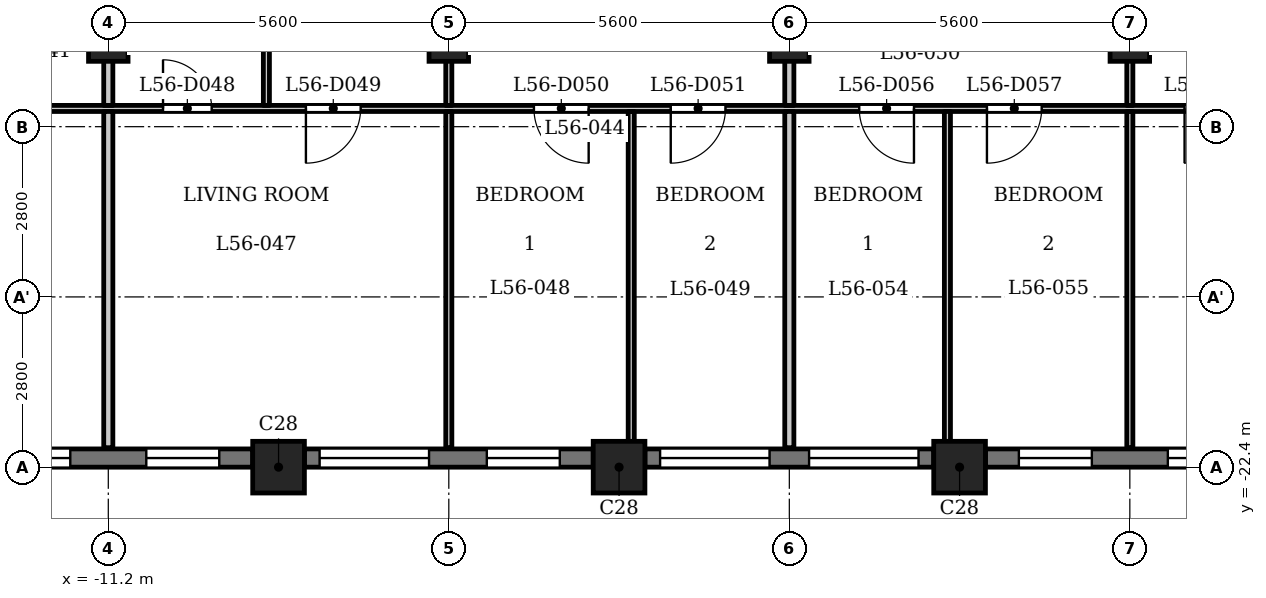
"""IFC4 building model, lengths in metres.
Left out: names, types, materials, properties, quantities, classifications, styles, units other than length and angle.
Written with IfcOpenShell. Run it as: python <this file> out.ifc"""

import sys

from ifc_helpers import new_model, si_unit, direction, frame, frame_2d, origin, origin_2d, place, context, subcontext, project, spatial, rectangle, extrude, element, fill, save


model = new_model("IFC4")
c1 = context("Model", 3, precision=1e-05, world=origin(), true_north=direction((0.0, 1.0)))
c2 = subcontext(c1, "Body", "Model", "MODEL_VIEW")
j1 = project(units=[si_unit("LENGTHUNIT", "METRE"), si_unit("PLANEANGLEUNIT", "RADIAN")], contexts=[c1])
p1 = place(None, origin())
s1 = spatial("IfcSite", under=j1, at=p1, CompositionType="ELEMENT")
p2 = place(p1, origin())
s2 = spatial("IfcBuilding", under=s1, at=p2, CompositionType="ELEMENT")
p3 = place(p2, frame((0.0, 0.0, 216.9)))
s3 = spatial("IfcBuildingStorey", under=s2, at=p3, CompositionType="ELEMENT", Elevation=216.9)
for number, where, z_axis, x_axis in (
    (1, (-8.4, -22.4, 0.0), (0.0, 0.0, 1.0), (1.0, 0.0, 0.0)),
    (2, (-2.8, -22.4, 0.0), (0.0, 0.0, 1.0), (1.0, 0.0, 0.0)),
    (3, (2.8, -22.4, 0.0), (0.0, 0.0, 1.0), (1.0, 0.0, 0.0)),
):
    element("IfcColumn", number, at=place(p3, frame(where, z_axis=z_axis, x_axis=x_axis)), inside=s3, PredefinedType="COLUMN", context=c2, shape_type="SweptSolid", body=[
        extrude(rectangle(XDim=0.85, YDim=0.85, at=origin_2d()), origin(), (0.0, 0.0, 1.0), 3.5),
    ])
for number, where, z_axis, x_axis in (
    (4, (-11.2, -15.4, 0.0), (0.0, 0.0, 1.0), (1.0, 0.0, 0.0)),
    (5, (-5.6, -15.4, 0.0), (0.0, 0.0, 1.0), (1.0, 0.0, 0.0)),
    (6, (0.0, -15.4, 0.0), (0.0, 0.0, 1.0), (1.0, 0.0, 0.0)),
    (7, (5.6, -15.4, 0.0), (0.0, 0.0, 1.0), (1.0, 0.0, 0.0)),
):
    element("IfcColumn", number, at=place(p3, frame(where, z_axis=z_axis, x_axis=x_axis)), inside=s3, PredefinedType="COLUMN", context=c2, shape_type="SweptSolid", body=[
        extrude(rectangle(XDim=0.65, YDim=0.65, at=origin_2d()), origin(), (0.0, 0.0, 1.0), 3.5),
    ])
p4 = place(p3, frame((-13.575, -22.25, 0.0), z_axis=(0.0, 0.0, 1.0), x_axis=(1.0, 0.0, 0.0)))
e8 = element("IfcWall", 8, at=p4, inside=s3, PredefinedType="SOLIDWALL", context=c2, shape_type="SweptSolid", body=[
    extrude(rectangle(XDim=4.75, YDim=0.3, at=frame_2d((2.375, 0.0))), origin(), (0.0, 0.0, 1.0), 2.5),
])
p5 = place(p4, frame((0.55, 0.0, 0.6)))
e9 = element("IfcOpeningElement", 9, at=p5, cuts=e8, PredefinedType="OPENING", context=c2, shape_type="SweptSolid", body=[
    extrude(rectangle(XDim=1.2, YDim=1.55, at=frame_2d((0.6, 0.775))), frame((0.0, 0.16, 0.0), z_axis=(0.0, -1.0, 0.0), x_axis=(1.0, 0.0, 0.0)), (0.0, 0.0, 1.0), 0.32),
])
p6 = place(p4, frame((3.0, 0.0, 0.6)))
e10 = element("IfcOpeningElement", 10, at=p6, cuts=e8, PredefinedType="OPENING", context=c2, shape_type="SweptSolid", body=[
    extrude(rectangle(XDim=1.2, YDim=1.55, at=frame_2d((0.6, 0.775))), frame((0.0, 0.16, 0.0), z_axis=(0.0, -1.0, 0.0), x_axis=(1.0, 0.0, 0.0)), (0.0, 0.0, 1.0), 0.32),
])
p7 = place(p3, frame((-7.975, -22.25, 0.0), z_axis=(0.0, 0.0, 1.0), x_axis=(1.0, 0.0, 0.0)))
e11 = element("IfcWall", 11, at=p7, inside=s3, PredefinedType="SOLIDWALL", context=c2, shape_type="SweptSolid", body=[
    extrude(rectangle(XDim=4.75, YDim=0.3, at=frame_2d((2.375, 0.0))), origin(), (0.0, 0.0, 1.0), 2.5),
])
p8 = place(p7, frame((0.25, 0.0, 0.9)))
e12 = element("IfcOpeningElement", 12, at=p8, cuts=e11, PredefinedType="OPENING", context=c2, shape_type="SweptSolid", body=[
    extrude(rectangle(XDim=1.8, YDim=1.25, at=frame_2d((0.9, 0.625))), frame((0.0, 0.16, 0.0), z_axis=(0.0, -1.0, 0.0), x_axis=(1.0, 0.0, 0.0)), (0.0, 0.0, 1.0), 0.32),
])
p9 = place(p7, frame((3.0, 0.0, 0.6)))
e13 = element("IfcOpeningElement", 13, at=p9, cuts=e11, PredefinedType="OPENING", context=c2, shape_type="SweptSolid", body=[
    extrude(rectangle(XDim=1.2, YDim=1.55, at=frame_2d((0.6, 0.775))), frame((0.0, 0.16, 0.0), z_axis=(0.0, -1.0, 0.0), x_axis=(1.0, 0.0, 0.0)), (0.0, 0.0, 1.0), 0.32),
])
p10 = place(p3, frame((-2.375, -22.25, 0.0), z_axis=(0.0, 0.0, 1.0), x_axis=(1.0, 0.0, 0.0)))
e14 = element("IfcWall", 14, at=p10, inside=s3, PredefinedType="SOLIDWALL", context=c2, shape_type="SweptSolid", body=[
    extrude(rectangle(XDim=4.75, YDim=0.3, at=frame_2d((2.375, 0.0))), origin(), (0.0, 0.0, 1.0), 2.5),
])
p11 = place(p10, frame((0.25, 0.0, 0.9)))
e15 = element("IfcOpeningElement", 15, at=p11, cuts=e14, PredefinedType="OPENING", context=c2, shape_type="SweptSolid", body=[
    extrude(rectangle(XDim=1.8, YDim=1.25, at=frame_2d((0.9, 0.625))), frame((0.0, 0.16, 0.0), z_axis=(0.0, -1.0, 0.0), x_axis=(1.0, 0.0, 0.0)), (0.0, 0.0, 1.0), 0.32),
])
p12 = place(p10, frame((2.7, 0.0, 0.9)))
e16 = element("IfcOpeningElement", 16, at=p12, cuts=e14, PredefinedType="OPENING", context=c2, shape_type="SweptSolid", body=[
    extrude(rectangle(XDim=1.8, YDim=1.25, at=frame_2d((0.9, 0.625))), frame((0.0, 0.16, 0.0), z_axis=(0.0, -1.0, 0.0), x_axis=(1.0, 0.0, 0.0)), (0.0, 0.0, 1.0), 0.32),
])
p13 = place(p3, frame((3.225, -22.25, 0.0), z_axis=(0.0, 0.0, 1.0), x_axis=(1.0, 0.0, 0.0)))
e17 = element("IfcWall", 17, at=p13, inside=s3, PredefinedType="SOLIDWALL", context=c2, shape_type="SweptSolid", body=[
    extrude(rectangle(XDim=4.75, YDim=0.3, at=frame_2d((2.375, 0.0))), origin(), (0.0, 0.0, 1.0), 2.5),
])
p14 = place(p13, frame((0.55, 0.0, 0.6)))
e18 = element("IfcOpeningElement", 18, at=p14, cuts=e17, PredefinedType="OPENING", context=c2, shape_type="SweptSolid", body=[
    extrude(rectangle(XDim=1.2, YDim=1.55, at=frame_2d((0.6, 0.775))), frame((0.0, 0.16, 0.0), z_axis=(0.0, -1.0, 0.0), x_axis=(1.0, 0.0, 0.0)), (0.0, 0.0, 1.0), 0.32),
])
p15 = place(p13, frame((3.0, 0.0, 0.6)))
e19 = element("IfcOpeningElement", 19, at=p15, cuts=e17, PredefinedType="OPENING", context=c2, shape_type="SweptSolid", body=[
    extrude(rectangle(XDim=1.2, YDim=1.55, at=frame_2d((0.6, 0.775))), frame((0.0, 0.16, 0.0), z_axis=(0.0, -1.0, 0.0), x_axis=(1.0, 0.0, 0.0)), (0.0, 0.0, 1.0), 0.32),
])
p16 = place(p3, frame((-16.725, -16.5, 0.0), z_axis=(0.0, 0.0, 1.0), x_axis=(1.0, 0.0, 0.0)))
e20 = element("IfcWall", 20, at=p16, inside=s3, PredefinedType="PARTITIONING", context=c2, shape_type="SweptSolid", body=[
    extrude(rectangle(XDim=33.45, YDim=0.1, at=frame_2d((16.725, 0.0))), origin(), (0.0, 0.0, 1.0), 3.2),
])
p17 = place(p16, frame((0.675, 0.0, 0.0)))
e21 = element("IfcOpeningElement", 21, at=p17, cuts=e20, PredefinedType="OPENING", context=c2, shape_type="SweptSolid", body=[
    extrude(rectangle(XDim=0.8, YDim=2.1, at=frame_2d((0.4, 1.05))), frame((0.0, 0.06, 0.0), z_axis=(0.0, -1.0, 0.0), x_axis=(1.0, 0.0, 0.0)), (0.0, 0.0, 1.0), 0.12),
])
p18 = place(p16, frame((2.775, 0.0, 0.0)))
e22 = element("IfcOpeningElement", 22, at=p18, cuts=e20, PredefinedType="OPENING", context=c2, shape_type="SweptSolid", body=[
    extrude(rectangle(XDim=0.9, YDim=2.1, at=frame_2d((0.45, 1.05))), frame((0.0, 0.06, 0.0), z_axis=(0.0, -1.0, 0.0), x_axis=(1.0, 0.0, 0.0)), (0.0, 0.0, 1.0), 0.12),
])
p19 = place(p16, frame((6.425, 0.0, 0.0)))
e23 = element("IfcOpeningElement", 23, at=p19, cuts=e20, PredefinedType="OPENING", context=c2, shape_type="SweptSolid", body=[
    extrude(rectangle(XDim=0.8, YDim=2.1, at=frame_2d((0.4, 1.05))), frame((0.0, 0.06, 0.0), z_axis=(0.0, -1.0, 0.0), x_axis=(1.0, 0.0, 0.0)), (0.0, 0.0, 1.0), 0.12),
])
p20 = place(p16, frame((8.775, 0.0, 0.0)))
e24 = element("IfcOpeningElement", 24, at=p20, cuts=e20, PredefinedType="OPENING", context=c2, shape_type="SweptSolid", body=[
    extrude(rectangle(XDim=0.9, YDim=2.1, at=frame_2d((0.45, 1.05))), frame((0.0, 0.06, 0.0), z_axis=(0.0, -1.0, 0.0), x_axis=(1.0, 0.0, 0.0)), (0.0, 0.0, 1.0), 0.12),
])
p21 = place(p16, frame((12.525, 0.0, 0.0)))
e25 = element("IfcOpeningElement", 25, at=p21, cuts=e20, PredefinedType="OPENING", context=c2, shape_type="SweptSolid", body=[
    extrude(rectangle(XDim=0.9, YDim=2.1, at=frame_2d((0.45, 1.05))), frame((0.0, 0.06, 0.0), z_axis=(0.0, -1.0, 0.0), x_axis=(1.0, 0.0, 0.0)), (0.0, 0.0, 1.0), 0.12),
])
p22 = place(p16, frame((14.775, 0.0, 0.0)))
e26 = element("IfcOpeningElement", 26, at=p22, cuts=e20, PredefinedType="OPENING", context=c2, shape_type="SweptSolid", body=[
    extrude(rectangle(XDim=0.9, YDim=2.1, at=frame_2d((0.45, 1.05))), frame((0.0, 0.06, 0.0), z_axis=(0.0, -1.0, 0.0), x_axis=(1.0, 0.0, 0.0)), (0.0, 0.0, 1.0), 0.12),
])
p23 = place(p16, frame((25.475, 0.0, 0.0)))
e27 = element("IfcOpeningElement", 27, at=p23, cuts=e20, PredefinedType="OPENING", context=c2, shape_type="SweptSolid", body=[
    extrude(rectangle(XDim=0.8, YDim=2.1, at=frame_2d((0.4, 1.05))), frame((0.0, 0.06, 0.0), z_axis=(0.0, -1.0, 0.0), x_axis=(1.0, 0.0, 0.0)), (0.0, 0.0, 1.0), 0.12),
])
p24 = place(p16, frame((23.225, 0.0, 0.0)))
e28 = element("IfcOpeningElement", 28, at=p24, cuts=e20, PredefinedType="OPENING", context=c2, shape_type="SweptSolid", body=[
    extrude(rectangle(XDim=0.9, YDim=2.1, at=frame_2d((0.45, 1.05))), frame((0.0, 0.06, 0.0), z_axis=(0.0, -1.0, 0.0), x_axis=(1.0, 0.0, 0.0)), (0.0, 0.0, 1.0), 0.12),
])
p25 = place(p16, frame((17.875, 0.0, 0.0)))
e29 = element("IfcOpeningElement", 29, at=p25, cuts=e20, PredefinedType="OPENING", context=c2, shape_type="SweptSolid", body=[
    extrude(rectangle(XDim=0.9, YDim=2.1, at=frame_2d((0.45, 1.05))), frame((0.0, 0.06, 0.0), z_axis=(0.0, -1.0, 0.0), x_axis=(1.0, 0.0, 0.0)), (0.0, 0.0, 1.0), 0.12),
])
p26 = place(p16, frame((19.975, 0.0, 0.0)))
e30 = element("IfcOpeningElement", 30, at=p26, cuts=e20, PredefinedType="OPENING", context=c2, shape_type="SweptSolid", body=[
    extrude(rectangle(XDim=0.9, YDim=2.1, at=frame_2d((0.45, 1.05))), frame((0.0, 0.06, 0.0), z_axis=(0.0, -1.0, 0.0), x_axis=(1.0, 0.0, 0.0)), (0.0, 0.0, 1.0), 0.12),
])
p27 = place(p16, frame((30.825, 0.0, 0.0)))
e31 = element("IfcOpeningElement", 31, at=p27, cuts=e20, PredefinedType="OPENING", context=c2, shape_type="SweptSolid", body=[
    extrude(rectangle(XDim=0.8, YDim=2.1, at=frame_2d((0.4, 1.05))), frame((0.0, 0.06, 0.0), z_axis=(0.0, -1.0, 0.0), x_axis=(1.0, 0.0, 0.0)), (0.0, 0.0, 1.0), 0.12),
])
p28 = place(p16, frame((29.075, 0.0, 0.0)))
e32 = element("IfcOpeningElement", 32, at=p28, cuts=e20, PredefinedType="OPENING", context=c2, shape_type="SweptSolid", body=[
    extrude(rectangle(XDim=0.9, YDim=2.1, at=frame_2d((0.45, 1.05))), frame((0.0, 0.06, 0.0), z_axis=(0.0, -1.0, 0.0), x_axis=(1.0, 0.0, 0.0)), (0.0, 0.0, 1.0), 0.12),
])
p29 = place(p3, frame((-11.2, -22.08, 0.0), z_axis=(0.0, 0.0, 1.0), x_axis=(0.0, 1.0, 0.0)))
e33 = element("IfcWall", 33, at=p29, inside=s3, PredefinedType="PARTITIONING", context=c2, shape_type="SweptSolid", body=[
    extrude(rectangle(XDim=5.53, YDim=0.15, at=frame_2d((2.765, 0.0))), origin(), (0.0, 0.0, 1.0), 3.2),
])
p30 = place(p3, frame((-11.2, -16.45, 0.0), z_axis=(0.0, 0.0, 1.0), x_axis=(0.0, 1.0, 0.0)))
e34 = element("IfcWall", 34, at=p30, inside=s3, PredefinedType="PARTITIONING", context=c2, shape_type="SweptSolid", body=[
    extrude(rectangle(XDim=3.175, YDim=0.15, at=frame_2d((1.587, 0.0))), origin(), (0.0, 0.0, 1.0), 3.2),
])
p31 = place(p3, frame((-8.6, -16.45, 0.0), z_axis=(0.0, 0.0, 1.0), x_axis=(0.0, 1.0, 0.0)))
e35 = element("IfcWall", 35, at=p31, inside=s3, PredefinedType="PARTITIONING", context=c2, shape_type="SweptSolid", body=[
    extrude(rectangle(XDim=3.175, YDim=0.1, at=frame_2d((1.587, 0.0))), origin(), (0.0, 0.0, 1.0), 3.2),
])
p32 = place(p3, frame((-5.6, -22.08, 0.0), z_axis=(0.0, 0.0, 1.0), x_axis=(0.0, 1.0, 0.0)))
e36 = element("IfcWall", 36, at=p32, inside=s3, PredefinedType="PARTITIONING", context=c2, shape_type="SweptSolid", body=[
    extrude(rectangle(XDim=5.53, YDim=0.1, at=frame_2d((2.765, 0.0))), origin(), (0.0, 0.0, 1.0), 3.2),
])
p33 = place(p3, frame((-5.6, -16.45, 0.0), z_axis=(0.0, 0.0, 1.0), x_axis=(0.0, 1.0, 0.0)))
e37 = element("IfcWall", 37, at=p33, inside=s3, PredefinedType="PARTITIONING", context=c2, shape_type="SweptSolid", body=[
    extrude(rectangle(XDim=3.175, YDim=0.1, at=frame_2d((1.587, 0.0))), origin(), (0.0, 0.0, 1.0), 3.2),
])
p34 = place(p33, frame((1.699, 0.0, 0.0)))
e38 = element("IfcOpeningElement", 38, at=p34, cuts=e37, PredefinedType="OPENING", context=c2, shape_type="SweptSolid", body=[
    extrude(rectangle(XDim=0.9, YDim=2.1, at=frame_2d((0.45, 1.05))), frame((0.0, 0.06, 0.0), z_axis=(0.0, -1.0, 0.0), x_axis=(1.0, 0.0, 0.0)), (0.0, 0.0, 1.0), 0.12),
])
p35 = place(p3, frame((-2.6, -22.805, 0.0), z_axis=(0.0, 0.0, 1.0), x_axis=(0.0, 1.0, 0.0)))
e39 = element("IfcWall", 39, at=p35, inside=s3, PredefinedType="PARTITIONING", context=c2, shape_type="SweptSolid", body=[
    extrude(rectangle(XDim=6.255, YDim=0.1, at=frame_2d((3.127, 0.0))), origin(), (0.0, 0.0, 1.0), 3.2),
])
p36 = place(p3, frame((0.0, -22.08, 0.0), z_axis=(0.0, 0.0, 1.0), x_axis=(0.0, 1.0, 0.0)))
e40 = element("IfcWall", 40, at=p36, inside=s3, PredefinedType="PARTITIONING", context=c2, shape_type="SweptSolid", body=[
    extrude(rectangle(XDim=5.53, YDim=0.15, at=frame_2d((2.765, 0.0))), origin(), (0.0, 0.0, 1.0), 3.2),
])
p37 = place(p3, frame((0.0, -16.45, 0.0), z_axis=(0.0, 0.0, 1.0), x_axis=(0.0, 1.0, 0.0)))
e41 = element("IfcWall", 41, at=p37, inside=s3, PredefinedType="PARTITIONING", context=c2, shape_type="SweptSolid", body=[
    extrude(rectangle(XDim=3.175, YDim=0.15, at=frame_2d((1.587, 0.0))), origin(), (0.0, 0.0, 1.0), 3.2),
])
p38 = place(p3, frame((2.6, -22.805, 0.0), z_axis=(0.0, 0.0, 1.0), x_axis=(0.0, 1.0, 0.0)))
e42 = element("IfcWall", 42, at=p38, inside=s3, PredefinedType="PARTITIONING", context=c2, shape_type="SweptSolid", body=[
    extrude(rectangle(XDim=6.255, YDim=0.1, at=frame_2d((3.127, 0.0))), origin(), (0.0, 0.0, 1.0), 3.2),
])
p39 = place(p3, frame((5.6, -22.08, 0.0), z_axis=(0.0, 0.0, 1.0), x_axis=(0.0, 1.0, 0.0)))
e43 = element("IfcWall", 43, at=p39, inside=s3, PredefinedType="PARTITIONING", context=c2, shape_type="SweptSolid", body=[
    extrude(rectangle(XDim=5.53, YDim=0.1, at=frame_2d((2.765, 0.0))), origin(), (0.0, 0.0, 1.0), 3.2),
])
p40 = place(p3, frame((5.6, -16.45, 0.0), z_axis=(0.0, 0.0, 1.0), x_axis=(0.0, 1.0, 0.0)))
e44 = element("IfcWall", 44, at=p40, inside=s3, PredefinedType="PARTITIONING", context=c2, shape_type="SweptSolid", body=[
    extrude(rectangle(XDim=3.175, YDim=0.1, at=frame_2d((1.587, 0.0))), origin(), (0.0, 0.0, 1.0), 3.2),
])
p41 = place(p40, frame((1.6, 0.0, 0.0)))
e45 = element("IfcOpeningElement", 45, at=p41, cuts=e44, PredefinedType="OPENING", context=c2, shape_type="SweptSolid", body=[
    extrude(rectangle(XDim=0.9, YDim=2.1, at=frame_2d((0.45, 1.05))), frame((0.0, 0.06, 0.0), z_axis=(0.0, -1.0, 0.0), x_axis=(1.0, 0.0, 0.0)), (0.0, 0.0, 1.0), 0.12),
])
p42 = place(p19, origin())
e46 = element("IfcDoor", 46, at=p42, inside=s3, OperationType="SINGLE_SWING_RIGHT", PredefinedType="DOOR", context=c2, shape_type="SweptSolid", body=[
    extrude(rectangle(XDim=0.8, YDim=2.1, at=frame_2d((0.4, 1.05))), frame((0.0, 0.025, 0.0), z_axis=(0.0, -1.0, 0.0), x_axis=(1.0, 0.0, 0.0)), (0.0, 0.0, 1.0), 0.05),
])
fill(e23, e46)
p43 = place(p20, origin())
e47 = element("IfcDoor", 47, at=p43, inside=s3, OperationType="SINGLE_SWING_LEFT", PredefinedType="DOOR", context=c2, shape_type="SweptSolid", body=[
    extrude(rectangle(XDim=0.9, YDim=2.1, at=frame_2d((0.45, 1.05))), frame((0.0, 0.025, 0.0), z_axis=(0.0, -1.0, 0.0), x_axis=(1.0, 0.0, 0.0)), (0.0, 0.0, 1.0), 0.05),
])
fill(e24, e47)
p44 = place(p21, origin())
e48 = element("IfcDoor", 48, at=p44, inside=s3, OperationType="SINGLE_SWING_RIGHT", PredefinedType="DOOR", context=c2, shape_type="SweptSolid", body=[
    extrude(rectangle(XDim=0.9, YDim=2.1, at=frame_2d((0.45, 1.05))), frame((0.0, 0.025, 0.0), z_axis=(0.0, -1.0, 0.0), x_axis=(1.0, 0.0, 0.0)), (0.0, 0.0, 1.0), 0.05),
])
fill(e25, e48)
p45 = place(p22, origin())
e49 = element("IfcDoor", 49, at=p45, inside=s3, OperationType="SINGLE_SWING_LEFT", PredefinedType="DOOR", context=c2, shape_type="SweptSolid", body=[
    extrude(rectangle(XDim=0.9, YDim=2.1, at=frame_2d((0.45, 1.05))), frame((0.0, 0.025, 0.0), z_axis=(0.0, -1.0, 0.0), x_axis=(1.0, 0.0, 0.0)), (0.0, 0.0, 1.0), 0.05),
])
fill(e26, e49)
p46 = place(p24, origin())
e50 = element("IfcDoor", 50, at=p46, inside=s3, OperationType="SINGLE_SWING_LEFT", PredefinedType="DOOR", context=c2, shape_type="SweptSolid", body=[
    extrude(rectangle(XDim=0.9, YDim=2.1, at=frame_2d((0.45, 1.05))), frame((0.0, 0.025, 0.0), z_axis=(0.0, -1.0, 0.0), x_axis=(1.0, 0.0, 0.0)), (0.0, 0.0, 1.0), 0.05),
])
fill(e28, e50)
p47 = place(p25, origin())
e51 = element("IfcDoor", 51, at=p47, inside=s3, OperationType="SINGLE_SWING_RIGHT", PredefinedType="DOOR", context=c2, shape_type="SweptSolid", body=[
    extrude(rectangle(XDim=0.9, YDim=2.1, at=frame_2d((0.45, 1.05))), frame((0.0, 0.025, 0.0), z_axis=(0.0, -1.0, 0.0), x_axis=(1.0, 0.0, 0.0)), (0.0, 0.0, 1.0), 0.05),
])
fill(e29, e51)
p48 = place(p26, origin())
e52 = element("IfcDoor", 52, at=p48, inside=s3, OperationType="SINGLE_SWING_LEFT", PredefinedType="DOOR", context=c2, shape_type="SweptSolid", body=[
    extrude(rectangle(XDim=0.9, YDim=2.1, at=frame_2d((0.45, 1.05))), frame((0.0, 0.025, 0.0), z_axis=(0.0, -1.0, 0.0), x_axis=(1.0, 0.0, 0.0)), (0.0, 0.0, 1.0), 0.05),
])
fill(e30, e52)
p49 = place(p5, origin())
e53 = element("IfcWindow", 53, at=p49, inside=s3, PartitioningType="SINGLE_PANEL", PredefinedType="WINDOW", context=c2, shape_type="SweptSolid", body=[
    extrude(rectangle(XDim=1.2, YDim=1.55, at=frame_2d((0.6, 0.775))), frame((0.0, 0.03, 0.0), z_axis=(0.0, -1.0, 0.0), x_axis=(1.0, 0.0, 0.0)), (0.0, 0.0, 1.0), 0.06),
])
fill(e9, e53)
p50 = place(p6, origin())
e54 = element("IfcWindow", 54, at=p50, inside=s3, PartitioningType="SINGLE_PANEL", PredefinedType="WINDOW", context=c2, shape_type="SweptSolid", body=[
    extrude(rectangle(XDim=1.2, YDim=1.55, at=frame_2d((0.6, 0.775))), frame((0.0, 0.03, 0.0), z_axis=(0.0, -1.0, 0.0), x_axis=(1.0, 0.0, 0.0)), (0.0, 0.0, 1.0), 0.06),
])
fill(e10, e54)
p51 = place(p8, origin())
e55 = element("IfcWindow", 55, at=p51, inside=s3, PartitioningType="SINGLE_PANEL", PredefinedType="WINDOW", context=c2, shape_type="SweptSolid", body=[
    extrude(rectangle(XDim=1.8, YDim=1.25, at=frame_2d((0.9, 0.625))), frame((0.0, 0.03, 0.0), z_axis=(0.0, -1.0, 0.0), x_axis=(1.0, 0.0, 0.0)), (0.0, 0.0, 1.0), 0.06),
])
fill(e12, e55)
p52 = place(p9, origin())
e56 = element("IfcWindow", 56, at=p52, inside=s3, PartitioningType="SINGLE_PANEL", PredefinedType="WINDOW", context=c2, shape_type="SweptSolid", body=[
    extrude(rectangle(XDim=1.2, YDim=1.55, at=frame_2d((0.6, 0.775))), frame((0.0, 0.03, 0.0), z_axis=(0.0, -1.0, 0.0), x_axis=(1.0, 0.0, 0.0)), (0.0, 0.0, 1.0), 0.06),
])
fill(e13, e56)
p53 = place(p11, origin())
e57 = element("IfcWindow", 57, at=p53, inside=s3, PartitioningType="SINGLE_PANEL", PredefinedType="WINDOW", context=c2, shape_type="SweptSolid", body=[
    extrude(rectangle(XDim=1.8, YDim=1.25, at=frame_2d((0.9, 0.625))), frame((0.0, 0.03, 0.0), z_axis=(0.0, -1.0, 0.0), x_axis=(1.0, 0.0, 0.0)), (0.0, 0.0, 1.0), 0.06),
])
fill(e15, e57)
p54 = place(p12, origin())
e58 = element("IfcWindow", 58, at=p54, inside=s3, PartitioningType="SINGLE_PANEL", PredefinedType="WINDOW", context=c2, shape_type="SweptSolid", body=[
    extrude(rectangle(XDim=1.8, YDim=1.25, at=frame_2d((0.9, 0.625))), frame((0.0, 0.03, 0.0), z_axis=(0.0, -1.0, 0.0), x_axis=(1.0, 0.0, 0.0)), (0.0, 0.0, 1.0), 0.06),
])
fill(e16, e58)
p55 = place(p14, origin())
e59 = element("IfcWindow", 59, at=p55, inside=s3, PartitioningType="SINGLE_PANEL", PredefinedType="WINDOW", context=c2, shape_type="SweptSolid", body=[
    extrude(rectangle(XDim=1.2, YDim=1.55, at=frame_2d((0.6, 0.775))), frame((0.0, 0.03, 0.0), z_axis=(0.0, -1.0, 0.0), x_axis=(1.0, 0.0, 0.0)), (0.0, 0.0, 1.0), 0.06),
])
fill(e18, e59)
p56 = place(p15, origin())
e60 = element("IfcWindow", 60, at=p56, inside=s3, PartitioningType="SINGLE_PANEL", PredefinedType="WINDOW", context=c2, shape_type="SweptSolid", body=[
    extrude(rectangle(XDim=1.2, YDim=1.55, at=frame_2d((0.6, 0.775))), frame((0.0, 0.03, 0.0), z_axis=(0.0, -1.0, 0.0), x_axis=(1.0, 0.0, 0.0)), (0.0, 0.0, 1.0), 0.06),
])
fill(e19, e60)
save(model, sys.argv[1])
